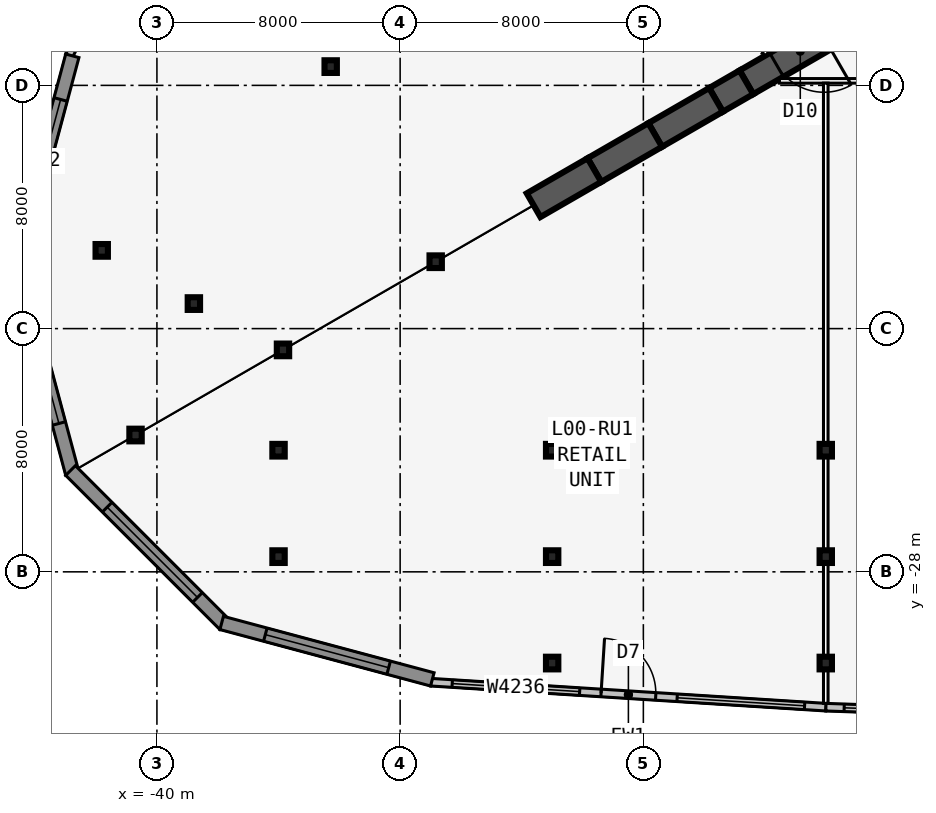
"""IFC4 building model, lengths in metres.
Left out: names, types, materials, properties, quantities, classifications, styles, units other than length and angle.
Written with IfcOpenShell. Run it as: python <this file> out.ifc"""

import sys

from ifc_helpers import new_model, si_unit, direction, frame, frame_2d, origin, origin_2d, place, context, subcontext, project, spatial, rectangle, i_section, extrude, element, fill, save


model = new_model("IFC4")
c1 = context("Model", 3, precision=1e-05, world=origin(), true_north=direction((0.0, 1.0)))
c2 = subcontext(c1, "Body", "Model", "MODEL_VIEW")
j1 = project(units=[si_unit("LENGTHUNIT", "METRE"), si_unit("PLANEANGLEUNIT", "RADIAN")], contexts=[c1])
p1 = place(None, origin())
s1 = spatial("IfcSite", under=j1, at=p1, CompositionType="ELEMENT")
p2 = place(p1, origin())
s2 = spatial("IfcBuilding", under=s1, at=p2, CompositionType="ELEMENT")
p3 = place(p2, origin())
s3 = spatial("IfcBuildingStorey", under=s2, at=p3, CompositionType="ELEMENT", Elevation=0.0)
p4 = place(p3, frame((-16.5, -9.526, -0.3), z_axis=(0.0, 0.0, 1.0), x_axis=(-0.866031398331, -0.499989616998, 0.0)))
e1 = element("IfcWall", 1, at=p4, inside=s3, PredefinedType="SHEAR", context=c2, shape_type="SweptSolid", body=[
    extrude(rectangle(XDim=4.746, YDim=0.9, at=frame_2d((2.373, 0.0))), origin(), (0.0, 0.0, 1.0), 6.3),
])
p5 = place(p4, frame((1.8, 0.0, 0.3)))
e2 = element("IfcOpeningElement", 2, at=p5, cuts=e1, PredefinedType="OPENING", context=c2, shape_type="SweptSolid", body=[
    extrude(rectangle(XDim=1.8, YDim=2.13, at=frame_2d((0.9, 1.065))), frame((0.0, 0.46, 0.0), z_axis=(0.0, -1.0, 0.0), x_axis=(1.0, 0.0, 0.0)), (0.0, 0.0, 1.0), 0.92),
])
p6 = place(p3, frame((-20.61, -11.899, -0.3), z_axis=(0.0, 0.0, 1.0), x_axis=(-0.866009537788, -0.500027479704, 0.0)))
e3 = element("IfcWall", 3, at=p6, inside=s3, PredefinedType="SHEAR", context=c2, shape_type="SweptSolid", body=[
    extrude(rectangle(XDim=1.155, YDim=0.9, at=frame_2d((0.577, 0.0))), origin(), (0.0, 0.0, 1.0), 6.3),
])
for number, where, z_axis, x_axis in (
    (4, (-21.61, -12.477, -0.3), (0.0, 0.0, 1.0), (-0.866, -0.5, 0.0)),
    (5, (-23.61, -13.631, -0.3), (0.0, 0.0, 1.0), (-0.866, -0.5, 0.0)),
    (6, (-25.61, -14.786, -0.3), (0.0, 0.0, 1.0), (-0.866, -0.5, 0.0)),
):
    element("IfcWall", number, at=place(p3, frame(where, z_axis=z_axis, x_axis=x_axis)), inside=s3, PredefinedType="SHEAR", context=c2, shape_type="SweptSolid", body=[
        extrude(rectangle(XDim=2.309, YDim=0.9, at=frame_2d((1.155, 0.0))), origin(), (0.0, 0.0, 1.0), 6.3),
    ])
for number, where, z_axis, x_axis in (
    (7, (-30.831, -17.8, -0.3), (0.0, 0.0, 1.0), (1.0, 0.0, 0.0)),
    (8, (-35.854, -20.7, -0.3), (0.0, 0.0, 1.0), (1.0, 0.0, 0.0)),
    (9, (-40.703, -23.5, -0.3), (0.0, 0.0, 1.0), (1.0, 0.0, 0.0)),
    (10, (-18.0, -24.0, -0.3), (0.0, 0.0, 1.0), (1.0, 0.0, 0.0)),
    (11, (-27.0, -24.0, -0.3), (0.0, 0.0, 1.0), (1.0, 0.0, 0.0)),
    (12, (-36.0, -24.0, -0.3), (0.0, 0.0, 1.0), (1.0, 0.0, 0.0)),
    (13, (-34.285, -11.383, -0.3), (0.0, 0.0, 1.0), (1.0, 0.0, 0.0)),
    (14, (-38.785, -19.177, -0.3), (0.0, 0.0, 1.0), (1.0, 0.0, 0.0)),
    (15, (-18.0, -27.5, -0.3), (0.0, 0.0, 1.0), (1.0, 0.0, 0.0)),
    (16, (-27.0, -27.5, -0.3), (0.0, 0.0, 1.0), (1.0, 0.0, 0.0)),
    (17, (-36.0, -27.5, -0.3), (0.0, 0.0, 1.0), (1.0, 0.0, 0.0)),
    (18, (-41.816, -17.427, -0.3), (0.0, 0.0, 1.0), (1.0, 0.0, 0.0)),
    (19, (-18.0, -31.0, -0.3), (0.0, 0.0, 1.0), (1.0, 0.0, 0.0)),
    (20, (-27.0, -31.0, -0.3), (0.0, 0.0, 1.0), (1.0, 0.0, 0.0)),
):
    element("IfcColumn", number, at=place(p3, frame(where, z_axis=z_axis, x_axis=x_axis)), inside=s3, PredefinedType="COLUMN", context=c2, shape_type="SweptSolid", body=[
        extrude(i_section(OverallWidth=0.406, OverallDepth=0.417, WebThickness=0.03, FlangeThickness=0.048, at=origin_2d()), origin(), (0.0, 0.0, 1.0), 6.3),
    ])
p7 = place(p3, frame((-30.992, -31.629, -0.3), z_axis=(0.0, 0.0, 1.0), x_axis=(0.998006805525, -0.063106387361, 0.0)))
e21 = element("IfcWall", 21, at=p7, inside=s3, PredefinedType="STANDARD", context=c2, shape_type="SweptSolid", body=[
    extrude(rectangle(XDim=13.026, YDim=0.25, at=frame_2d((6.513, 0.0))), origin(), (0.0, 0.0, 1.0), 6.05),
])
p8 = place(p7, frame((5.613, 0.0, 0.3)))
e22 = element("IfcOpeningElement", 22, at=p8, cuts=e21, PredefinedType="OPENING", context=c2, shape_type="SweptSolid", body=[
    extrude(rectangle(XDim=1.8, YDim=2.7, at=frame_2d((0.9, 1.35))), frame((0.0, 0.135, 0.0), z_axis=(0.0, -1.0, 0.0), x_axis=(1.0, 0.0, 0.0)), (0.0, 0.0, 1.0), 0.27),
])
p9 = place(p7, frame((0.707, 0.0, 1.2)))
e23 = element("IfcOpeningElement", 23, at=p9, cuts=e21, PredefinedType="OPENING", context=c2, shape_type="SweptSolid", body=[
    extrude(rectangle(XDim=4.2, YDim=3.6, at=frame_2d((2.1, 1.8))), frame((0.0, 0.135, 0.0), z_axis=(0.0, -1.0, 0.0), x_axis=(1.0, 0.0, 0.0)), (0.0, 0.0, 1.0), 0.27),
])
p10 = place(p7, frame((8.119, 0.0, 1.2)))
e24 = element("IfcOpeningElement", 24, at=p10, cuts=e21, PredefinedType="OPENING", context=c2, shape_type="SweptSolid", body=[
    extrude(rectangle(XDim=4.2, YDim=3.6, at=frame_2d((2.1, 1.8))), frame((0.0, 0.135, 0.0), z_axis=(0.0, -1.0, 0.0), x_axis=(1.0, 0.0, 0.0)), (0.0, 0.0, 1.0), 0.27),
])
p11 = place(p3, frame((-17.996, -32.451, -0.3), z_axis=(0.0, 0.0, 1.0), x_axis=(0.999393961522, -0.034809620405, 0.0)))
e25 = element("IfcWall", 25, at=p11, inside=s3, PredefinedType="STANDARD", context=c2, shape_type="SweptSolid", body=[
    extrude(rectangle(XDim=9.005, YDim=0.25, at=frame_2d((4.503, 0.0))), origin(), (0.0, 0.0, 1.0), 6.05),
])
p12 = place(p11, frame((3.603, 0.0, 0.3)))
e26 = element("IfcOpeningElement", 26, at=p12, cuts=e25, PredefinedType="OPENING", context=c2, shape_type="SweptSolid", body=[
    extrude(rectangle(XDim=1.8, YDim=2.7, at=frame_2d((0.9, 1.35))), frame((0.0, 0.135, 0.0), z_axis=(0.0, -1.0, 0.0), x_axis=(1.0, 0.0, 0.0)), (0.0, 0.0, 1.0), 0.27),
])
p13 = place(p11, frame((0.601, 0.0, 1.2)))
e27 = element("IfcOpeningElement", 27, at=p13, cuts=e25, PredefinedType="OPENING", context=c2, shape_type="SweptSolid", body=[
    extrude(rectangle(XDim=2.4, YDim=3.6, at=frame_2d((1.2, 1.8))), frame((0.0, 0.135, 0.0), z_axis=(0.0, -1.0, 0.0), x_axis=(1.0, 0.0, 0.0)), (0.0, 0.0, 1.0), 0.27),
])
p14 = place(p11, frame((6.004, 0.0, 1.2)))
e28 = element("IfcOpeningElement", 28, at=p14, cuts=e25, PredefinedType="OPENING", context=c2, shape_type="SweptSolid", body=[
    extrude(rectangle(XDim=2.4, YDim=3.6, at=frame_2d((1.2, 1.8))), frame((0.0, 0.135, 0.0), z_axis=(0.0, -1.0, 0.0), x_axis=(1.0, 0.0, 0.0)), (0.0, 0.0, 1.0), 0.27),
])
p15 = place(p3, frame((-37.1, 0.644, -0.3), z_axis=(0.0, 0.0, 1.0), x_axis=(-0.444354908353, -0.895850833243, 0.0)))
e29 = element("IfcWall", 29, at=p15, inside=s3, PredefinedType="STANDARD", context=c2, shape_type="SweptSolid", body=[
    extrude(rectangle(XDim=13.026, YDim=0.25, at=frame_2d((6.513, 0.0))), origin(), (0.0, 0.0, 1.0), 6.05),
])
p16 = place(p15, frame((4.413, 0.0, 1.2)))
e30 = element("IfcOpeningElement", 30, at=p16, cuts=e29, PredefinedType="OPENING", context=c2, shape_type="SweptSolid", body=[
    extrude(rectangle(XDim=4.2, YDim=3.6, at=frame_2d((2.1, 1.8))), frame((0.0, 0.135, 0.0), z_axis=(0.0, -1.0, 0.0), x_axis=(1.0, 0.0, 0.0)), (0.0, 0.0, 1.0), 0.27),
])
p17 = place(p3, frame((-42.783, -11.028, -0.3), z_axis=(0.0, 0.0, 1.0), x_axis=(-0.258823421857, -0.965924653531, 0.0)))
e31 = element("IfcWall", 31, at=p17, inside=s3, PredefinedType="SOLIDWALL", context=c2, shape_type="SweptSolid", body=[
    extrude(rectangle(XDim=7.173, YDim=0.45, at=frame_2d((3.586, 0.0))), origin(), (0.0, 0.0, 1.0), 6.05),
])
p18 = place(p17, frame((1.486, 0.0, 1.2)))
e32 = element("IfcOpeningElement", 32, at=p18, cuts=e31, PredefinedType="OPENING", context=c2, shape_type="SweptSolid", body=[
    extrude(rectangle(XDim=4.2, YDim=3.6, at=frame_2d((2.1, 1.8))), frame((0.0, 0.235, 0.0), z_axis=(0.0, -1.0, 0.0), x_axis=(1.0, 0.0, 0.0)), (0.0, 0.0, 1.0), 0.47),
])
p19 = place(p3, frame((-44.639, -17.84, -0.3), z_axis=(0.0, 0.0, 1.0), x_axis=(0.258823421857, -0.965924653531, 0.0)))
e33 = element("IfcWall", 33, at=p19, inside=s3, PredefinedType="SOLIDWALL", context=c2, shape_type="SweptSolid", body=[
    extrude(rectangle(XDim=7.173, YDim=0.45, at=frame_2d((3.586, 0.0))), origin(), (0.0, 0.0, 1.0), 6.05),
])
p20 = place(p19, frame((1.268, 0.0, 1.2)))
e34 = element("IfcOpeningElement", 34, at=p20, cuts=e33, PredefinedType="OPENING", context=c2, shape_type="SweptSolid", body=[
    extrude(rectangle(XDim=4.2, YDim=3.6, at=frame_2d((2.1, 1.8))), frame((0.0, 0.235, 0.0), z_axis=(0.0, -1.0, 0.0), x_axis=(1.0, 0.0, 0.0)), (0.0, 0.0, 1.0), 0.47),
])
p21 = place(p3, frame((-42.841, -24.667, -0.3), z_axis=(0.0, 0.0, 1.0), x_axis=(0.707106781187, -0.707106781187, 0.0)))
e35 = element("IfcWall", 35, at=p21, inside=s3, PredefinedType="SOLIDWALL", context=c2, shape_type="SweptSolid", body=[
    extrude(rectangle(XDim=7.173, YDim=0.45, at=frame_2d((3.586, 0.0))), origin(), (0.0, 0.0, 1.0), 6.05),
])
p22 = place(p21, frame((1.705, 0.0, 1.2)))
e36 = element("IfcOpeningElement", 36, at=p22, cuts=e35, PredefinedType="OPENING", context=c2, shape_type="SweptSolid", body=[
    extrude(rectangle(XDim=4.2, YDim=3.6, at=frame_2d((2.1, 1.8))), frame((0.0, 0.235, 0.0), z_axis=(0.0, -1.0, 0.0), x_axis=(1.0, 0.0, 0.0)), (0.0, 0.0, 1.0), 0.47),
])
p23 = place(p3, frame((-37.87, -29.681, -0.3), z_axis=(0.0, 0.0, 1.0), x_axis=(0.965924653531, -0.258823421857, 0.0)))
e37 = element("IfcWall", 37, at=p23, inside=s3, PredefinedType="SOLIDWALL", context=c2, shape_type="SweptSolid", body=[
    extrude(rectangle(XDim=7.173, YDim=0.45, at=frame_2d((3.586, 0.0))), origin(), (0.0, 0.0, 1.0), 6.05),
])
p24 = place(p23, frame((1.486, 0.0, 1.2)))
e38 = element("IfcOpeningElement", 38, at=p24, cuts=e37, PredefinedType="OPENING", context=c2, shape_type="SweptSolid", body=[
    extrude(rectangle(XDim=4.2, YDim=3.6, at=frame_2d((2.1, 1.8))), frame((0.0, 0.235, 0.0), z_axis=(0.0, -1.0, 0.0), x_axis=(1.0, 0.0, 0.0)), (0.0, 0.0, 1.0), 0.47),
])
p25 = place(p3, frame((-19.527, -11.851, -0.3), z_axis=(0.0, 0.0, 1.0), x_axis=(1.0, 0.0, 0.0)))
e39 = element("IfcWall", 39, at=p25, inside=s3, PredefinedType="PARTITIONING", context=c2, shape_type="SweptSolid", body=[
    extrude(rectangle(XDim=39.054, YDim=0.15, at=frame_2d((19.527, 0.0))), origin(), (0.0, 0.0, 1.0), 5.108),
])
p26 = place(p25, frame((8.427, 0.0, 0.3)))
e40 = element("IfcOpeningElement", 40, at=p26, cuts=e39, PredefinedType="OPENING", context=c2, shape_type="SweptSolid", body=[
    extrude(rectangle(XDim=1.8, YDim=2.13, at=frame_2d((0.9, 1.065))), frame((0.0, 0.085, 0.0), z_axis=(0.0, -1.0, 0.0), x_axis=(1.0, 0.0, 0.0)), (0.0, 0.0, 1.0), 0.17),
])
p27 = place(p25, frame((18.427, 0.0, 0.3)))
e41 = element("IfcOpeningElement", 41, at=p27, cuts=e39, PredefinedType="OPENING", context=c2, shape_type="SweptSolid", body=[
    extrude(rectangle(XDim=1.8, YDim=2.13, at=frame_2d((0.9, 1.065))), frame((0.0, 0.085, 0.0), z_axis=(0.0, -1.0, 0.0), x_axis=(1.0, 0.0, 0.0)), (0.0, 0.0, 1.0), 0.17),
])
p28 = place(p25, frame((23.227, 0.0, 0.3)))
e42 = element("IfcOpeningElement", 42, at=p28, cuts=e39, PredefinedType="OPENING", context=c2, shape_type="SweptSolid", body=[
    extrude(rectangle(XDim=1.8, YDim=2.13, at=frame_2d((0.9, 1.065))), frame((0.0, 0.085, 0.0), z_axis=(0.0, -1.0, 0.0), x_axis=(1.0, 0.0, 0.0)), (0.0, 0.0, 1.0), 0.17),
])
p29 = place(p25, frame((28.127, 0.0, 0.3)))
e43 = element("IfcOpeningElement", 43, at=p29, cuts=e39, PredefinedType="OPENING", context=c2, shape_type="SweptSolid", body=[
    extrude(rectangle(XDim=1.0, YDim=2.13, at=frame_2d((0.5, 1.065))), frame((0.0, 0.085, 0.0), z_axis=(0.0, -1.0, 0.0), x_axis=(1.0, 0.0, 0.0)), (0.0, 0.0, 1.0), 0.17),
])
p30 = place(p25, frame((33.74, 0.0, 0.3)))
e44 = element("IfcOpeningElement", 44, at=p30, cuts=e39, PredefinedType="OPENING", context=c2, shape_type="SweptSolid", body=[
    extrude(rectangle(XDim=1.8, YDim=2.13, at=frame_2d((0.9, 1.065))), frame((0.0, 0.085, 0.0), z_axis=(0.0, -1.0, 0.0), x_axis=(1.0, 0.0, 0.0)), (0.0, 0.0, 1.0), 0.17),
])
p31 = place(p3, frame((-18.0, -11.926, -0.3), z_axis=(0.0, 0.0, 1.0), x_axis=(0.0, -1.0, 0.0)))
e45 = element("IfcWall", 45, at=p31, inside=s3, PredefinedType="PARTITIONING", context=c2, shape_type="SweptSolid", body=[
    extrude(rectangle(XDim=20.399, YDim=0.15, at=frame_2d((10.2, 0.0))), origin(), (0.0, 0.0, 1.0), 6.05),
])
p32 = place(p3, frame((-0.5, 22.836, -0.3), z_axis=(0.0, 0.0, 1.0), x_axis=(-0.500001677587, -0.866024435227, 0.0)))
e46 = element("IfcWall", 46, at=p32, inside=s3, PredefinedType="PARTITIONING", context=c2, shape_type="SweptSolid", body=[
    extrude(rectangle(XDim=39.054, YDim=0.15, at=frame_2d((19.527, 0.0))), origin(), (0.0, 0.0, 1.0), 5.108),
])
p33 = place(p32, frame((2.013, 0.0, 0.3)))
e47 = element("IfcOpeningElement", 47, at=p33, cuts=e46, PredefinedType="OPENING", context=c2, shape_type="SweptSolid", body=[
    extrude(rectangle(XDim=1.8, YDim=2.13, at=frame_2d((0.9, 1.065))), frame((0.0, 0.085, 0.0), z_axis=(0.0, -1.0, 0.0), x_axis=(1.0, 0.0, 0.0)), (0.0, 0.0, 1.0), 0.17),
])
p34 = place(p32, frame((10.427, 0.0, 0.3)))
e48 = element("IfcOpeningElement", 48, at=p34, cuts=e46, PredefinedType="OPENING", context=c2, shape_type="SweptSolid", body=[
    extrude(rectangle(XDim=1.8, YDim=2.13, at=frame_2d((0.9, 1.065))), frame((0.0, 0.085, 0.0), z_axis=(0.0, -1.0, 0.0), x_axis=(1.0, 0.0, 0.0)), (0.0, 0.0, 1.0), 0.17),
])
p35 = place(p32, frame((18.427, 0.0, 0.3)))
e49 = element("IfcOpeningElement", 49, at=p35, cuts=e46, PredefinedType="OPENING", context=c2, shape_type="SweptSolid", body=[
    extrude(rectangle(XDim=1.8, YDim=2.13, at=frame_2d((0.9, 1.065))), frame((0.0, 0.085, 0.0), z_axis=(0.0, -1.0, 0.0), x_axis=(1.0, 0.0, 0.0)), (0.0, 0.0, 1.0), 0.17),
])
p36 = place(p32, frame((23.227, 0.0, 0.3)))
e50 = element("IfcOpeningElement", 50, at=p36, cuts=e46, PredefinedType="OPENING", context=c2, shape_type="SweptSolid", body=[
    extrude(rectangle(XDim=1.8, YDim=2.13, at=frame_2d((0.9, 1.065))), frame((0.0, 0.085, 0.0), z_axis=(0.0, -1.0, 0.0), x_axis=(1.0, 0.0, 0.0)), (0.0, 0.0, 1.0), 0.17),
])
p37 = place(p32, frame((27.627, 0.0, 0.3)))
e51 = element("IfcOpeningElement", 51, at=p37, cuts=e46, PredefinedType="OPENING", context=c2, shape_type="SweptSolid", body=[
    extrude(rectangle(XDim=1.0, YDim=2.13, at=frame_2d((0.5, 1.065))), frame((0.0, 0.085, 0.0), z_axis=(0.0, -1.0, 0.0), x_axis=(1.0, 0.0, 0.0)), (0.0, 0.0, 1.0), 0.17),
])
p38 = place(p32, frame((30.277, 0.0, 0.3)))
e52 = element("IfcOpeningElement", 52, at=p38, cuts=e46, PredefinedType="OPENING", context=c2, shape_type="SweptSolid", body=[
    extrude(rectangle(XDim=1.0, YDim=2.13, at=frame_2d((0.5, 1.065))), frame((0.0, 0.085, 0.0), z_axis=(0.0, -1.0, 0.0), x_axis=(1.0, 0.0, 0.0)), (0.0, 0.0, 1.0), 0.17),
])
p39 = place(p32, frame((34.89, 0.0, 0.3)))
e53 = element("IfcOpeningElement", 53, at=p39, cuts=e46, PredefinedType="OPENING", context=c2, shape_type="SweptSolid", body=[
    extrude(rectangle(XDim=1.0, YDim=2.13, at=frame_2d((0.5, 1.065))), frame((0.0, 0.085, 0.0), z_axis=(0.0, -1.0, 0.0), x_axis=(1.0, 0.0, 0.0)), (0.0, 0.0, 1.0), 0.17),
])
p40 = place(p8, origin())
e54 = element("IfcDoor", 54, at=p40, inside=s3, OperationType="DOUBLE_DOOR_SINGLE_SWING", PredefinedType="DOOR", context=c2, shape_type="SweptSolid", body=[
    extrude(rectangle(XDim=1.8, YDim=2.7, at=frame_2d((0.9, 1.35))), frame((0.0, 0.025, 0.0), z_axis=(0.0, -1.0, 0.0), x_axis=(1.0, 0.0, 0.0)), (0.0, 0.0, 1.0), 0.05),
])
fill(e22, e54)
p41 = place(p9, origin())
e55 = element("IfcWindow", 55, at=p41, inside=s3, PartitioningType="SINGLE_PANEL", PredefinedType="WINDOW", context=c2, shape_type="SweptSolid", body=[
    extrude(rectangle(XDim=4.2, YDim=3.6, at=frame_2d((2.1, 1.8))), frame((0.0, 0.03, 0.0), z_axis=(0.0, -1.0, 0.0), x_axis=(1.0, 0.0, 0.0)), (0.0, 0.0, 1.0), 0.06),
])
fill(e23, e55)
p42 = place(p10, origin())
e56 = element("IfcWindow", 56, at=p42, inside=s3, PartitioningType="SINGLE_PANEL", PredefinedType="WINDOW", context=c2, shape_type="SweptSolid", body=[
    extrude(rectangle(XDim=4.2, YDim=3.6, at=frame_2d((2.1, 1.8))), frame((0.0, 0.03, 0.0), z_axis=(0.0, -1.0, 0.0), x_axis=(1.0, 0.0, 0.0)), (0.0, 0.0, 1.0), 0.06),
])
fill(e24, e56)
p43 = place(p13, origin())
e57 = element("IfcWindow", 57, at=p43, inside=s3, PartitioningType="SINGLE_PANEL", PredefinedType="WINDOW", context=c2, shape_type="SweptSolid", body=[
    extrude(rectangle(XDim=2.4, YDim=3.6, at=frame_2d((1.2, 1.8))), frame((0.0, 0.03, 0.0), z_axis=(0.0, -1.0, 0.0), x_axis=(1.0, 0.0, 0.0)), (0.0, 0.0, 1.0), 0.06),
])
fill(e27, e57)
p44 = place(p18, origin())
e58 = element("IfcWindow", 58, at=p44, inside=s3, PartitioningType="SINGLE_PANEL", PredefinedType="WINDOW", context=c2, shape_type="SweptSolid", body=[
    extrude(rectangle(XDim=4.2, YDim=3.6, at=frame_2d((2.1, 1.8))), frame((0.0, 0.03, 0.0), z_axis=(0.0, -1.0, 0.0), x_axis=(1.0, 0.0, 0.0)), (0.0, 0.0, 1.0), 0.06),
])
fill(e32, e58)
p45 = place(p20, origin())
e59 = element("IfcWindow", 59, at=p45, inside=s3, PartitioningType="SINGLE_PANEL", PredefinedType="WINDOW", context=c2, shape_type="SweptSolid", body=[
    extrude(rectangle(XDim=4.2, YDim=3.6, at=frame_2d((2.1, 1.8))), frame((0.0, 0.03, 0.0), z_axis=(0.0, -1.0, 0.0), x_axis=(1.0, 0.0, 0.0)), (0.0, 0.0, 1.0), 0.06),
])
fill(e34, e59)
p46 = place(p22, origin())
e60 = element("IfcWindow", 60, at=p46, inside=s3, PartitioningType="SINGLE_PANEL", PredefinedType="WINDOW", context=c2, shape_type="SweptSolid", body=[
    extrude(rectangle(XDim=4.2, YDim=3.6, at=frame_2d((2.1, 1.8))), frame((0.0, 0.03, 0.0), z_axis=(0.0, -1.0, 0.0), x_axis=(1.0, 0.0, 0.0)), (0.0, 0.0, 1.0), 0.06),
])
fill(e36, e60)
p47 = place(p24, origin())
e61 = element("IfcWindow", 61, at=p47, inside=s3, PartitioningType="SINGLE_PANEL", PredefinedType="WINDOW", context=c2, shape_type="SweptSolid", body=[
    extrude(rectangle(XDim=4.2, YDim=3.6, at=frame_2d((2.1, 1.8))), frame((0.0, 0.03, 0.0), z_axis=(0.0, -1.0, 0.0), x_axis=(1.0, 0.0, 0.0)), (0.0, 0.0, 1.0), 0.06),
])
fill(e38, e61)
p48 = place(p5, origin())
e62 = element("IfcDoor", 62, at=p48, inside=s3, OperationType="DOUBLE_DOOR_DOUBLE_SWING", PredefinedType="DOOR", context=c2, shape_type="SweptSolid", body=[
    extrude(rectangle(XDim=1.8, YDim=2.13, at=frame_2d((0.9, 1.065))), frame((0.0, 0.025, 0.0), z_axis=(0.0, -1.0, 0.0), x_axis=(1.0, 0.0, 0.0)), (0.0, 0.0, 1.0), 0.05),
])
fill(e2, e62)
save(model, sys.argv[1])
